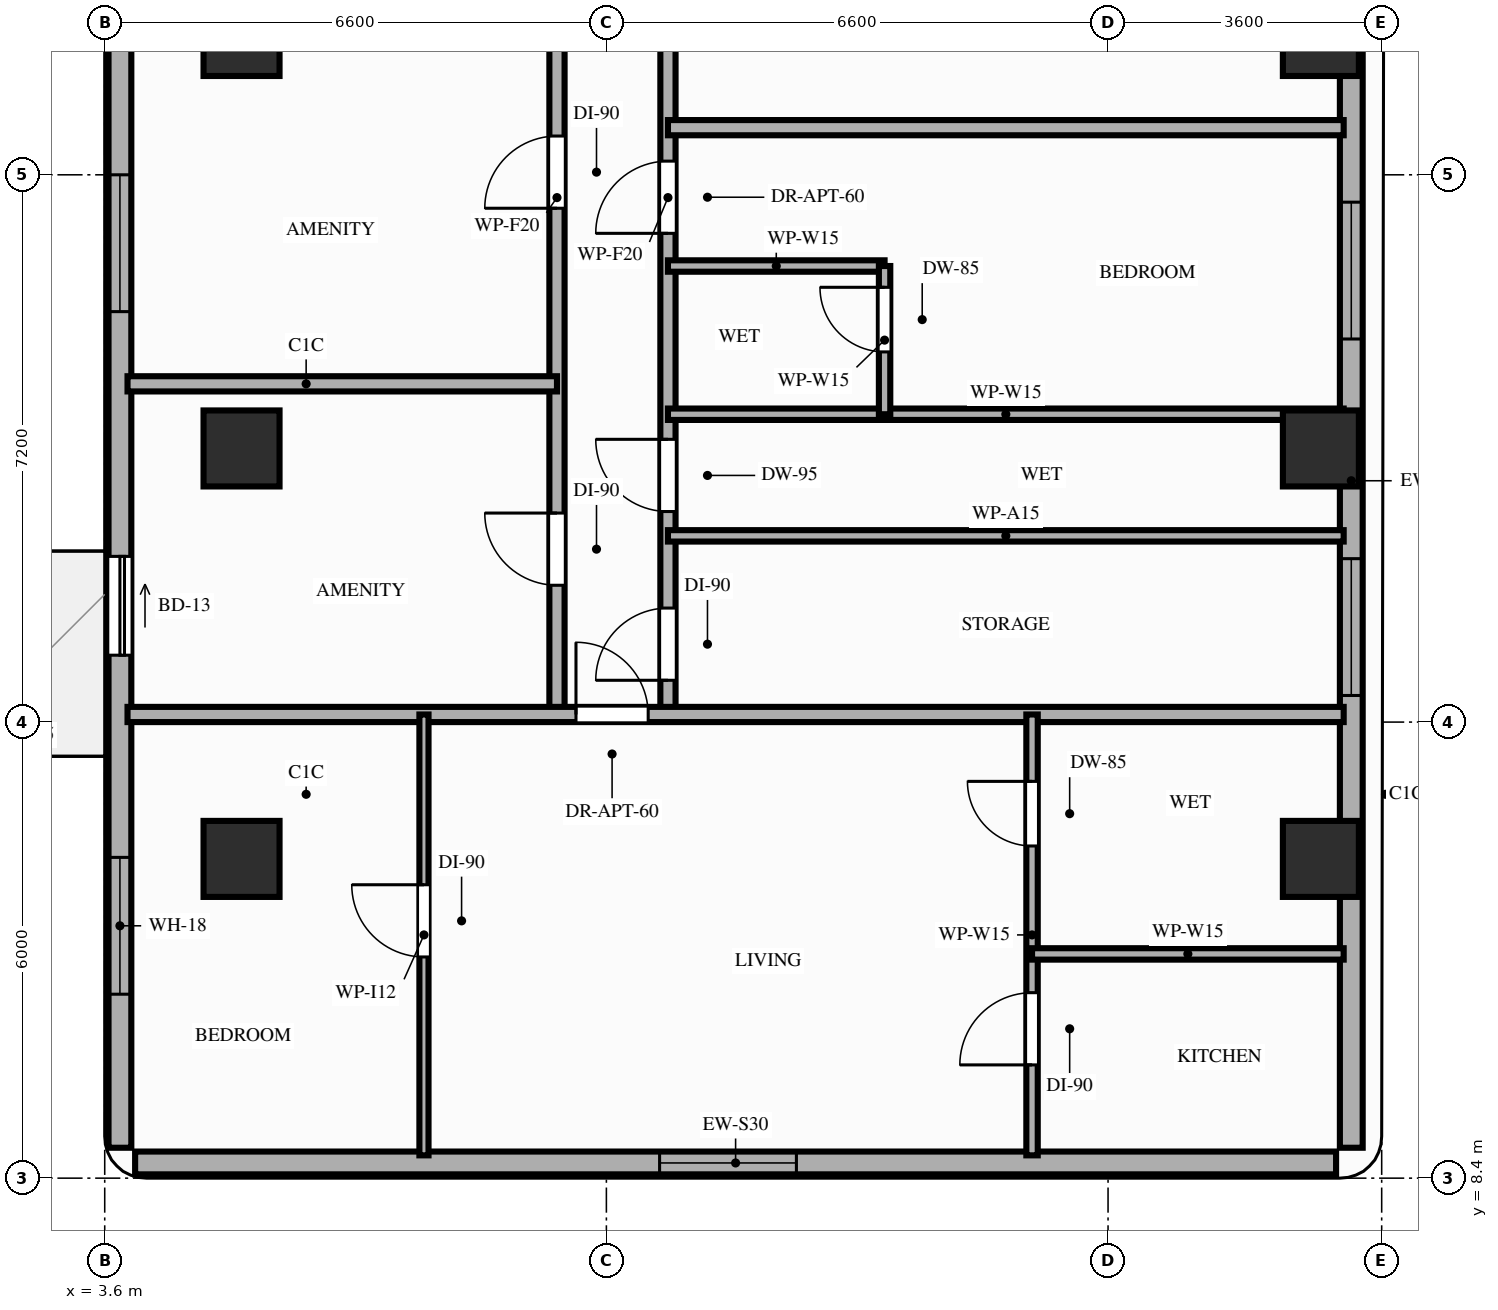
"""IFC4 building model, lengths in metres.
Left out: names, types, materials, properties, quantities, classifications, styles, units other than length and angle.
Written with IfcOpenShell. Run it as: python <this file> out.ifc"""

import sys

from ifc_helpers import new_model, si_unit, direction, frame, frame_2d, origin, origin_2d, place, context, subcontext, project, spatial, rectangle, extrude, element, fill, save


model = new_model("IFC4")
c1 = context("Model", 3, precision=1e-05, world=origin(), true_north=direction((0.0, 1.0)))
c2 = subcontext(c1, "Body", "Model", "MODEL_VIEW")
j1 = project(units=[si_unit("LENGTHUNIT", "METRE"), si_unit("PLANEANGLEUNIT", "RADIAN")], contexts=[c1])
p1 = place(None, origin())
s1 = spatial("IfcSite", under=j1, at=p1, CompositionType="ELEMENT")
p2 = place(p1, origin())
s2 = spatial("IfcBuilding", under=s1, at=p2, CompositionType="ELEMENT")
p3 = place(p2, frame((0.0, 0.0, 142.6)))
s3 = spatial("IfcBuildingStorey", under=s2, at=p3, CompositionType="ELEMENT", Elevation=142.6)
for number, where, z_axis, x_axis in (
    (1, (5.4, 12.6, 0.0), (0.0, 0.0, 1.0), (1.0, 0.0, 0.0)),
    (2, (19.6, 12.6, 0.0), (0.0, 0.0, 1.0), (1.0, 0.0, 0.0)),
    (3, (5.4, 18.0, 0.0), (0.0, 0.0, 1.0), (1.0, 0.0, 0.0)),
    (4, (19.6, 18.0, 0.0), (0.0, 0.0, 1.0), (1.0, 0.0, 0.0)),
    (5, (5.4, 23.4, 0.0), (0.0, 0.0, 1.0), (1.0, 0.0, 0.0)),
    (6, (19.6, 23.4, 0.0), (0.0, 0.0, 1.0), (1.0, 0.0, 0.0)),
):
    element("IfcColumn", number, at=place(p3, frame(where, z_axis=z_axis, x_axis=x_axis)), inside=s3, PredefinedType="COLUMN", context=c2, shape_type="SweptSolid", body=[
        extrude(rectangle(XDim=1.0, YDim=1.0, at=origin_2d()), origin(), (0.0, 0.0, 1.0), 3.2),
    ])
p4 = place(p3, frame((4.0, 8.6, 0.0), z_axis=(0.0, 0.0, 1.0), x_axis=(1.0, 0.0, 0.0)))
e7 = element("IfcWall", 7, at=p4, inside=s3, PredefinedType="STANDARD", context=c2, shape_type="SweptSolid", body=[
    extrude(rectangle(XDim=15.8, YDim=0.3, at=frame_2d((7.9, 0.0))), origin(), (0.0, 0.0, 1.0), 3.02),
])
p5 = place(p4, frame((6.9, 0.0, 0.85)))
e8 = element("IfcOpeningElement", 8, at=p5, cuts=e7, PredefinedType="OPENING", context=c2, shape_type="SweptSolid", body=[
    extrude(rectangle(XDim=1.8, YDim=1.75, at=frame_2d((0.9, 0.875))), frame((0.0, 0.16, 0.0), z_axis=(0.0, -1.0, 0.0), x_axis=(1.0, 0.0, 0.0)), (0.0, 0.0, 1.0), 0.32),
])
p6 = place(p3, frame((3.8, 42.1, 0.0), z_axis=(0.0, 0.0, 1.0), x_axis=(0.0, -1.0, 0.0)))
e9 = element("IfcWall", 9, at=p6, inside=s3, PredefinedType="STANDARD", context=c2, shape_type="SweptSolid", body=[
    extrude(rectangle(XDim=33.3, YDim=0.3, at=frame_2d((16.65, 0.0))), origin(), (0.0, 0.0, 1.0), 2.71),
])
p7 = place(p6, frame((25.52, 0.0, 0.0)))
e10 = element("IfcOpeningElement", 10, at=p7, cuts=e9, PredefinedType="OPENING", context=c2, shape_type="SweptSolid", body=[
    extrude(rectangle(XDim=1.3, YDim=2.08, at=frame_2d((0.65, 1.04))), frame((0.0, 0.16, 0.0), z_axis=(0.0, -1.0, 0.0), x_axis=(1.0, 0.0, 0.0)), (0.0, 0.0, 1.0), 0.32),
])
p8 = place(p6, frame((15.35, 0.0, 0.0)))
e11 = element("IfcOpeningElement", 11, at=p8, cuts=e9, PredefinedType="OPENING", context=c2, shape_type="SweptSolid", body=[
    extrude(rectangle(XDim=1.3, YDim=2.08, at=frame_2d((0.65, 1.04))), frame((0.0, 0.16, 0.0), z_axis=(0.0, -1.0, 0.0), x_axis=(1.0, 0.0, 0.0)), (0.0, 0.0, 1.0), 0.32),
])
p9 = place(p6, frame((29.48, 0.0, 0.85)))
e12 = element("IfcOpeningElement", 12, at=p9, cuts=e9, PredefinedType="OPENING", context=c2, shape_type="SweptSolid", body=[
    extrude(rectangle(XDim=1.8, YDim=1.61, at=frame_2d((0.9, 0.805))), frame((0.0, 0.16, 0.0), z_axis=(0.0, -1.0, 0.0), x_axis=(1.0, 0.0, 0.0)), (0.0, 0.0, 1.0), 0.32),
])
p10 = place(p6, frame((20.5, 0.0, 0.85)))
e13 = element("IfcOpeningElement", 13, at=p10, cuts=e9, PredefinedType="OPENING", context=c2, shape_type="SweptSolid", body=[
    extrude(rectangle(XDim=1.8, YDim=1.61, at=frame_2d((0.9, 0.805))), frame((0.0, 0.16, 0.0), z_axis=(0.0, -1.0, 0.0), x_axis=(1.0, 0.0, 0.0)), (0.0, 0.0, 1.0), 0.32),
])
p11 = place(p6, frame((9.9, 0.0, 0.85)))
e14 = element("IfcOpeningElement", 14, at=p11, cuts=e9, PredefinedType="OPENING", context=c2, shape_type="SweptSolid", body=[
    extrude(rectangle(XDim=1.8, YDim=1.61, at=frame_2d((0.9, 0.805))), frame((0.0, 0.16, 0.0), z_axis=(0.0, -1.0, 0.0), x_axis=(1.0, 0.0, 0.0)), (0.0, 0.0, 1.0), 0.32),
])
p12 = place(p6, frame((3.8, 0.0, 0.85)))
e15 = element("IfcOpeningElement", 15, at=p12, cuts=e9, PredefinedType="OPENING", context=c2, shape_type="SweptSolid", body=[
    extrude(rectangle(XDim=1.8, YDim=1.61, at=frame_2d((0.9, 0.805))), frame((0.0, 0.16, 0.0), z_axis=(0.0, -1.0, 0.0), x_axis=(1.0, 0.0, 0.0)), (0.0, 0.0, 1.0), 0.32),
])
p13 = place(p3, frame((20.0, 8.8, 0.0), z_axis=(0.0, 0.0, 1.0), x_axis=(0.0, 1.0, 0.0)))
e16 = element("IfcWall", 16, at=p13, inside=s3, PredefinedType="STANDARD", context=c2, shape_type="SweptSolid", body=[
    extrude(rectangle(XDim=17.55, YDim=0.3, at=frame_2d((8.775, 0.0))), origin(), (0.0, 0.0, 1.0), 2.45),
])
p14 = place(p13, frame((10.64, 0.0, 0.85)))
e17 = element("IfcOpeningElement", 17, at=p14, cuts=e16, PredefinedType="OPENING", context=c2, shape_type="SweptSolid", body=[
    extrude(rectangle(XDim=1.8, YDim=1.35, at=frame_2d((0.9, 0.675))), frame((0.0, 0.16, 0.0), z_axis=(0.0, -1.0, 0.0), x_axis=(1.0, 0.0, 0.0)), (0.0, 0.0, 1.0), 0.32),
])
p15 = place(p13, frame((5.95, 0.0, 0.85)))
e18 = element("IfcOpeningElement", 18, at=p15, cuts=e16, PredefinedType="OPENING", context=c2, shape_type="SweptSolid", body=[
    extrude(rectangle(XDim=1.8, YDim=1.35, at=frame_2d((0.9, 0.675))), frame((0.0, 0.16, 0.0), z_axis=(0.0, -1.0, 0.0), x_axis=(1.0, 0.0, 0.0)), (0.0, 0.0, 1.0), 0.32),
])
p16 = place(p3, frame((9.55, 14.5, 0.0), z_axis=(0.0, 0.0, 1.0), x_axis=(0.0, 1.0, 0.0)))
e19 = element("IfcWall", 19, at=p16, inside=s3, PredefinedType="PARTITIONING", context=c2, shape_type="SweptSolid", body=[
    extrude(rectangle(XDim=13.6, YDim=0.2, at=frame_2d((6.8, 0.0))), origin(), (0.0, 0.0, 1.0), 2.45),
])
p17 = place(p16, frame((1.7, 0.0, 0.0)))
e20 = element("IfcOpeningElement", 20, at=p17, cuts=e19, PredefinedType="OPENING", context=c2, shape_type="SweptSolid", body=[
    extrude(rectangle(XDim=0.95, YDim=2.15, at=frame_2d((0.475, 1.075))), frame((0.0, 0.11, 0.0), z_axis=(0.0, -1.0, 0.0), x_axis=(1.0, 0.0, 0.0)), (0.0, 0.0, 1.0), 0.22),
])
p18 = place(p16, frame((6.66, 0.0, 0.0)))
e21 = element("IfcOpeningElement", 21, at=p18, cuts=e19, PredefinedType="OPENING", context=c2, shape_type="SweptSolid", body=[
    extrude(rectangle(XDim=0.95, YDim=2.15, at=frame_2d((0.475, 1.075))), frame((0.0, 0.11, 0.0), z_axis=(0.0, -1.0, 0.0), x_axis=(1.0, 0.0, 0.0)), (0.0, 0.0, 1.0), 0.22),
])
p19 = place(p16, frame((11.29, 0.0, 0.0)))
e22 = element("IfcOpeningElement", 22, at=p19, cuts=e19, PredefinedType="OPENING", context=c2, shape_type="SweptSolid", body=[
    extrude(rectangle(XDim=0.95, YDim=2.15, at=frame_2d((0.475, 1.075))), frame((0.0, 0.11, 0.0), z_axis=(0.0, -1.0, 0.0), x_axis=(1.0, 0.0, 0.0)), (0.0, 0.0, 1.0), 0.22),
])
p20 = place(p3, frame((11.01, 14.5, 0.0), z_axis=(0.0, 0.0, 1.0), x_axis=(0.0, 1.0, 0.0)))
e23 = element("IfcWall", 23, at=p20, inside=s3, PredefinedType="PARTITIONING", context=c2, shape_type="SweptSolid", body=[
    extrude(rectangle(XDim=13.6, YDim=0.2, at=frame_2d((6.8, 0.0))), origin(), (0.0, 0.0, 1.0), 2.45),
])
p21 = place(p20, frame((0.45, 0.0, 0.0)))
e24 = element("IfcOpeningElement", 24, at=p21, cuts=e23, PredefinedType="OPENING", context=c2, shape_type="SweptSolid", body=[
    extrude(rectangle(XDim=0.95, YDim=2.15, at=frame_2d((0.475, 1.075))), frame((0.0, 0.11, 0.0), z_axis=(0.0, -1.0, 0.0), x_axis=(1.0, 0.0, 0.0)), (0.0, 0.0, 1.0), 0.22),
])
p22 = place(p20, frame((2.67, 0.0, 0.0)))
e25 = element("IfcOpeningElement", 25, at=p22, cuts=e23, PredefinedType="OPENING", context=c2, shape_type="SweptSolid", body=[
    extrude(rectangle(XDim=0.95, YDim=2.1, at=frame_2d((0.475, 1.05))), frame((0.0, 0.11, 0.0), z_axis=(0.0, -1.0, 0.0), x_axis=(1.0, 0.0, 0.0)), (0.0, 0.0, 1.0), 0.22),
])
p23 = place(p20, frame((10.18, 0.0, 0.0)))
e26 = element("IfcOpeningElement", 26, at=p23, cuts=e23, PredefinedType="OPENING", context=c2, shape_type="SweptSolid", body=[
    extrude(rectangle(XDim=0.95, YDim=2.15, at=frame_2d((0.475, 1.075))), frame((0.0, 0.11, 0.0), z_axis=(0.0, -1.0, 0.0), x_axis=(1.0, 0.0, 0.0)), (0.0, 0.0, 1.0), 0.22),
])
p24 = place(p20, frame((6.33, 0.0, 0.0)))
e27 = element("IfcOpeningElement", 27, at=p24, cuts=e23, PredefinedType="OPENING", context=c2, shape_type="SweptSolid", body=[
    extrude(rectangle(XDim=0.95, YDim=2.15, at=frame_2d((0.475, 1.075))), frame((0.0, 0.11, 0.0), z_axis=(0.0, -1.0, 0.0), x_axis=(1.0, 0.0, 0.0)), (0.0, 0.0, 1.0), 0.22),
])
p25 = place(p3, frame((3.9, 14.5, 0.0), z_axis=(0.0, 0.0, 1.0), x_axis=(1.0, 0.0, 0.0)))
e28 = element("IfcWall", 28, at=p25, inside=s3, PredefinedType="PARTITIONING", context=c2, shape_type="SweptSolid", body=[
    extrude(rectangle(XDim=16.0, YDim=0.2, at=frame_2d((8.0, 0.0))), origin(), (0.0, 0.0, 1.0), 2.45),
])
p26 = place(p25, frame((5.9, 0.0, 0.0)))
e29 = element("IfcOpeningElement", 29, at=p26, cuts=e28, PredefinedType="OPENING", context=c2, shape_type="SweptSolid", body=[
    extrude(rectangle(XDim=0.95, YDim=2.15, at=frame_2d((0.475, 1.075))), frame((0.0, 0.11, 0.0), z_axis=(0.0, -1.0, 0.0), x_axis=(1.0, 0.0, 0.0)), (0.0, 0.0, 1.0), 0.22),
])
p27 = place(p3, frame((3.9, 18.85, 0.0), z_axis=(0.0, 0.0, 1.0), x_axis=(1.0, 0.0, 0.0)))
e30 = element("IfcWall", 30, at=p27, inside=s3, PredefinedType="PARTITIONING", context=c2, shape_type="SweptSolid", body=[
    extrude(rectangle(XDim=5.65, YDim=0.2, at=frame_2d((2.825, 0.0))), origin(), (0.0, 0.0, 1.0), 2.45),
])
p28 = place(p3, frame((7.8, 8.7, 0.0), z_axis=(0.0, 0.0, 1.0), x_axis=(0.0, 1.0, 0.0)))
e31 = element("IfcWall", 31, at=p28, inside=s3, PredefinedType="PARTITIONING", context=c2, shape_type="SweptSolid", body=[
    extrude(rectangle(XDim=5.8, YDim=0.12, at=frame_2d((2.9, 0.0))), origin(), (0.0, 0.0, 1.0), 2.45),
])
p29 = place(p28, frame((2.61, 0.0, 0.0)))
e32 = element("IfcOpeningElement", 32, at=p29, cuts=e31, PredefinedType="OPENING", context=c2, shape_type="SweptSolid", body=[
    extrude(rectangle(XDim=0.95, YDim=2.15, at=frame_2d((0.475, 1.075))), frame((0.0, 0.07, 0.0), z_axis=(0.0, -1.0, 0.0), x_axis=(1.0, 0.0, 0.0)), (0.0, 0.0, 1.0), 0.14),
])
p30 = place(p3, frame((15.8, 8.7, 0.0), z_axis=(0.0, 0.0, 1.0), x_axis=(0.0, 1.0, 0.0)))
e33 = element("IfcWall", 33, at=p30, inside=s3, PredefinedType="PARTITIONING", context=c2, shape_type="SweptSolid", body=[
    extrude(rectangle(XDim=5.8, YDim=0.15, at=frame_2d((2.9, 0.0))), origin(), (0.0, 0.0, 1.0), 2.45),
])
p31 = place(p30, frame((1.19, 0.0, 0.0)))
e34 = element("IfcOpeningElement", 34, at=p31, cuts=e33, PredefinedType="OPENING", context=c2, shape_type="SweptSolid", body=[
    extrude(rectangle(XDim=0.95, YDim=2.15, at=frame_2d((0.475, 1.075))), frame((0.0, 0.085, 0.0), z_axis=(0.0, -1.0, 0.0), x_axis=(1.0, 0.0, 0.0)), (0.0, 0.0, 1.0), 0.17),
])
p32 = place(p30, frame((4.07, 0.0, 0.0)))
e35 = element("IfcOpeningElement", 35, at=p32, cuts=e33, PredefinedType="OPENING", context=c2, shape_type="SweptSolid", body=[
    extrude(rectangle(XDim=0.85, YDim=2.1, at=frame_2d((0.425, 1.05))), frame((0.0, 0.085, 0.0), z_axis=(0.0, -1.0, 0.0), x_axis=(1.0, 0.0, 0.0)), (0.0, 0.0, 1.0), 0.17),
])
p33 = place(p3, frame((15.8, 11.35, 0.0), z_axis=(0.0, 0.0, 1.0), x_axis=(1.0, 0.0, 0.0)))
e36 = element("IfcWall", 36, at=p33, inside=s3, PredefinedType="PARTITIONING", context=c2, shape_type="SweptSolid", body=[
    extrude(rectangle(XDim=4.1, YDim=0.15, at=frame_2d((2.05, 0.0))), origin(), (0.0, 0.0, 1.0), 3.02),
])
for number, where, z_axis, x_axis in (
    (37, (11.01, 16.85, 0.0), (0.0, 0.0, 1.0), (1.0, 0.0, 0.0)),
    (38, (11.01, 18.45, 0.0), (0.0, 0.0, 1.0), (1.0, 0.0, 0.0)),
):
    element("IfcWall", number, at=place(p3, frame(where, z_axis=z_axis, x_axis=x_axis)), inside=s3, PredefinedType="PARTITIONING", context=c2, shape_type="SweptSolid", body=[
        extrude(rectangle(XDim=8.89, YDim=0.15, at=frame_2d((4.445, 0.0))), origin(), (0.0, 0.0, 1.0), 2.45),
    ])
p34 = place(p3, frame((11.01, 22.22, 0.0), z_axis=(0.0, 0.0, 1.0), x_axis=(1.0, 0.0, 0.0)))
e39 = element("IfcWall", 39, at=p34, inside=s3, PredefinedType="PARTITIONING", context=c2, shape_type="SweptSolid", body=[
    extrude(rectangle(XDim=8.89, YDim=0.2, at=frame_2d((4.445, 0.0))), origin(), (0.0, 0.0, 1.0), 2.45),
])
p35 = place(p3, frame((11.01, 20.4, 0.0), z_axis=(0.0, 0.0, 1.0), x_axis=(1.0, 0.0, 0.0)))
e40 = element("IfcWall", 40, at=p35, inside=s3, PredefinedType="PARTITIONING", context=c2, shape_type="SweptSolid", body=[
    extrude(rectangle(XDim=2.85, YDim=0.15, at=frame_2d((1.425, 0.0))), origin(), (0.0, 0.0, 1.0), 3.02),
])
p36 = place(p3, frame((13.86, 18.45, 0.0), z_axis=(0.0, 0.0, 1.0), x_axis=(0.0, 1.0, 0.0)))
e41 = element("IfcWall", 41, at=p36, inside=s3, PredefinedType="PARTITIONING", context=c2, shape_type="SweptSolid", body=[
    extrude(rectangle(XDim=1.95, YDim=0.15, at=frame_2d((0.975, 0.0))), origin(), (0.0, 0.0, 1.0), 2.61),
])
p37 = place(p36, frame((0.82, 0.0, 0.0)))
e42 = element("IfcOpeningElement", 42, at=p37, cuts=e41, PredefinedType="OPENING", context=c2, shape_type="SweptSolid", body=[
    extrude(rectangle(XDim=0.85, YDim=2.1, at=frame_2d((0.425, 1.05))), frame((0.0, 0.085, 0.0), z_axis=(0.0, -1.0, 0.0), x_axis=(1.0, 0.0, 0.0)), (0.0, 0.0, 1.0), 0.17),
])
p38 = place(p7, origin())
e43 = element("IfcDoor", 43, at=p38, inside=s3, OperationType="SLIDING_TO_LEFT", PredefinedType="DOOR", context=c2, shape_type="SweptSolid", body=[
    extrude(rectangle(XDim=1.3, YDim=2.08, at=frame_2d((0.65, 1.04))), frame((0.0, 0.025, 0.0), z_axis=(0.0, -1.0, 0.0), x_axis=(1.0, 0.0, 0.0)), (0.0, 0.0, 1.0), 0.05),
])
fill(e10, e43)
p39 = place(p9, origin())
e44 = element("IfcWindow", 44, at=p39, inside=s3, PartitioningType="SINGLE_PANEL", PredefinedType="WINDOW", context=c2, shape_type="SweptSolid", body=[
    extrude(rectangle(XDim=1.8, YDim=1.61, at=frame_2d((0.9, 0.805))), frame((0.0, 0.03, 0.0), z_axis=(0.0, -1.0, 0.0), x_axis=(1.0, 0.0, 0.0)), (0.0, 0.0, 1.0), 0.06),
])
fill(e12, e44)
p40 = place(p5, origin())
e45 = element("IfcWindow", 45, at=p40, inside=s3, PartitioningType="SINGLE_PANEL", PredefinedType="WINDOW", context=c2, shape_type="SweptSolid", body=[
    extrude(rectangle(XDim=1.8, YDim=1.75, at=frame_2d((0.9, 0.875))), frame((0.0, 0.03, 0.0), z_axis=(0.0, -1.0, 0.0), x_axis=(1.0, 0.0, 0.0)), (0.0, 0.0, 1.0), 0.06),
])
fill(e8, e45)
p41 = place(p14, origin())
e46 = element("IfcWindow", 46, at=p41, inside=s3, PartitioningType="SINGLE_PANEL", PredefinedType="WINDOW", context=c2, shape_type="SweptSolid", body=[
    extrude(rectangle(XDim=1.8, YDim=1.35, at=frame_2d((0.9, 0.675))), frame((0.0, 0.03, 0.0), z_axis=(0.0, -1.0, 0.0), x_axis=(1.0, 0.0, 0.0)), (0.0, 0.0, 1.0), 0.06),
])
fill(e17, e46)
p42 = place(p10, origin())
e47 = element("IfcWindow", 47, at=p42, inside=s3, PartitioningType="SINGLE_PANEL", PredefinedType="WINDOW", context=c2, shape_type="SweptSolid", body=[
    extrude(rectangle(XDim=1.8, YDim=1.61, at=frame_2d((0.9, 0.805))), frame((0.0, 0.03, 0.0), z_axis=(0.0, -1.0, 0.0), x_axis=(1.0, 0.0, 0.0)), (0.0, 0.0, 1.0), 0.06),
])
fill(e13, e47)
p43 = place(p15, origin())
e48 = element("IfcWindow", 48, at=p43, inside=s3, PartitioningType="SINGLE_PANEL", PredefinedType="WINDOW", context=c2, shape_type="SweptSolid", body=[
    extrude(rectangle(XDim=1.8, YDim=1.35, at=frame_2d((0.9, 0.675))), frame((0.0, 0.03, 0.0), z_axis=(0.0, -1.0, 0.0), x_axis=(1.0, 0.0, 0.0)), (0.0, 0.0, 1.0), 0.06),
])
fill(e18, e48)
p44 = place(p17, origin())
e49 = element("IfcDoor", 49, at=p44, inside=s3, OperationType="SINGLE_SWING_RIGHT", PredefinedType="DOOR", context=c2, shape_type="SweptSolid", body=[
    extrude(rectangle(XDim=0.95, YDim=2.15, at=frame_2d((0.475, 1.075))), frame((0.0, 0.025, 0.0), z_axis=(0.0, -1.0, 0.0), x_axis=(1.0, 0.0, 0.0)), (0.0, 0.0, 1.0), 0.05),
])
fill(e20, e49)
p45 = place(p18, origin())
e50 = element("IfcDoor", 50, at=p45, inside=s3, OperationType="SINGLE_SWING_LEFT", PredefinedType="DOOR", context=c2, shape_type="SweptSolid", body=[
    extrude(rectangle(XDim=0.95, YDim=2.15, at=frame_2d((0.475, 1.075))), frame((0.0, 0.025, 0.0), z_axis=(0.0, -1.0, 0.0), x_axis=(1.0, 0.0, 0.0)), (0.0, 0.0, 1.0), 0.05),
])
fill(e21, e50)
p46 = place(p26, origin())
e51 = element("IfcDoor", 51, at=p46, inside=s3, OperationType="SINGLE_SWING_LEFT", PredefinedType="DOOR", context=c2, shape_type="SweptSolid", body=[
    extrude(rectangle(XDim=0.95, YDim=2.15, at=frame_2d((0.475, 1.075))), frame((0.0, 0.025, 0.0), z_axis=(0.0, -1.0, 0.0), x_axis=(1.0, 0.0, 0.0)), (0.0, 0.0, 1.0), 0.05),
])
fill(e29, e51)
p47 = place(p29, origin())
e52 = element("IfcDoor", 52, at=p47, inside=s3, OperationType="SINGLE_SWING_RIGHT", PredefinedType="DOOR", context=c2, shape_type="SweptSolid", body=[
    extrude(rectangle(XDim=0.95, YDim=2.15, at=frame_2d((0.475, 1.075))), frame((0.0, 0.025, 0.0), z_axis=(0.0, -1.0, 0.0), x_axis=(1.0, 0.0, 0.0)), (0.0, 0.0, 1.0), 0.05),
])
fill(e32, e52)
p48 = place(p31, origin())
e53 = element("IfcDoor", 53, at=p48, inside=s3, OperationType="SINGLE_SWING_LEFT", PredefinedType="DOOR", context=c2, shape_type="SweptSolid", body=[
    extrude(rectangle(XDim=0.95, YDim=2.15, at=frame_2d((0.475, 1.075))), frame((0.0, 0.025, 0.0), z_axis=(0.0, -1.0, 0.0), x_axis=(1.0, 0.0, 0.0)), (0.0, 0.0, 1.0), 0.05),
])
fill(e34, e53)
p49 = place(p32, origin())
e54 = element("IfcDoor", 54, at=p49, inside=s3, OperationType="SINGLE_SWING_RIGHT", PredefinedType="DOOR", context=c2, shape_type="SweptSolid", body=[
    extrude(rectangle(XDim=0.85, YDim=2.1, at=frame_2d((0.425, 1.05))), frame((0.0, 0.025, 0.0), z_axis=(0.0, -1.0, 0.0), x_axis=(1.0, 0.0, 0.0)), (0.0, 0.0, 1.0), 0.05),
])
fill(e35, e54)
p50 = place(p21, origin())
e55 = element("IfcDoor", 55, at=p50, inside=s3, OperationType="SINGLE_SWING_LEFT", PredefinedType="DOOR", context=c2, shape_type="SweptSolid", body=[
    extrude(rectangle(XDim=0.95, YDim=2.15, at=frame_2d((0.475, 1.075))), frame((0.0, 0.025, 0.0), z_axis=(0.0, -1.0, 0.0), x_axis=(1.0, 0.0, 0.0)), (0.0, 0.0, 1.0), 0.05),
])
fill(e24, e55)
p51 = place(p22, origin())
e56 = element("IfcDoor", 56, at=p51, inside=s3, OperationType="SINGLE_SWING_RIGHT", PredefinedType="DOOR", context=c2, shape_type="SweptSolid", body=[
    extrude(rectangle(XDim=0.95, YDim=2.1, at=frame_2d((0.475, 1.05))), frame((0.0, 0.025, 0.0), z_axis=(0.0, -1.0, 0.0), x_axis=(1.0, 0.0, 0.0)), (0.0, 0.0, 1.0), 0.05),
])
fill(e25, e56)
p52 = place(p37, origin())
e57 = element("IfcDoor", 57, at=p52, inside=s3, OperationType="SINGLE_SWING_RIGHT", PredefinedType="DOOR", context=c2, shape_type="SweptSolid", body=[
    extrude(rectangle(XDim=0.85, YDim=2.1, at=frame_2d((0.425, 1.05))), frame((0.0, 0.025, 0.0), z_axis=(0.0, -1.0, 0.0), x_axis=(1.0, 0.0, 0.0)), (0.0, 0.0, 1.0), 0.05),
])
fill(e42, e57)
p53 = place(p24, origin())
e58 = element("IfcDoor", 58, at=p53, inside=s3, OperationType="SINGLE_SWING_LEFT", PredefinedType="DOOR", context=c2, shape_type="SweptSolid", body=[
    extrude(rectangle(XDim=0.95, YDim=2.15, at=frame_2d((0.475, 1.075))), frame((0.0, 0.025, 0.0), z_axis=(0.0, -1.0, 0.0), x_axis=(1.0, 0.0, 0.0)), (0.0, 0.0, 1.0), 0.05),
])
fill(e27, e58)
save(model, sys.argv[1])
